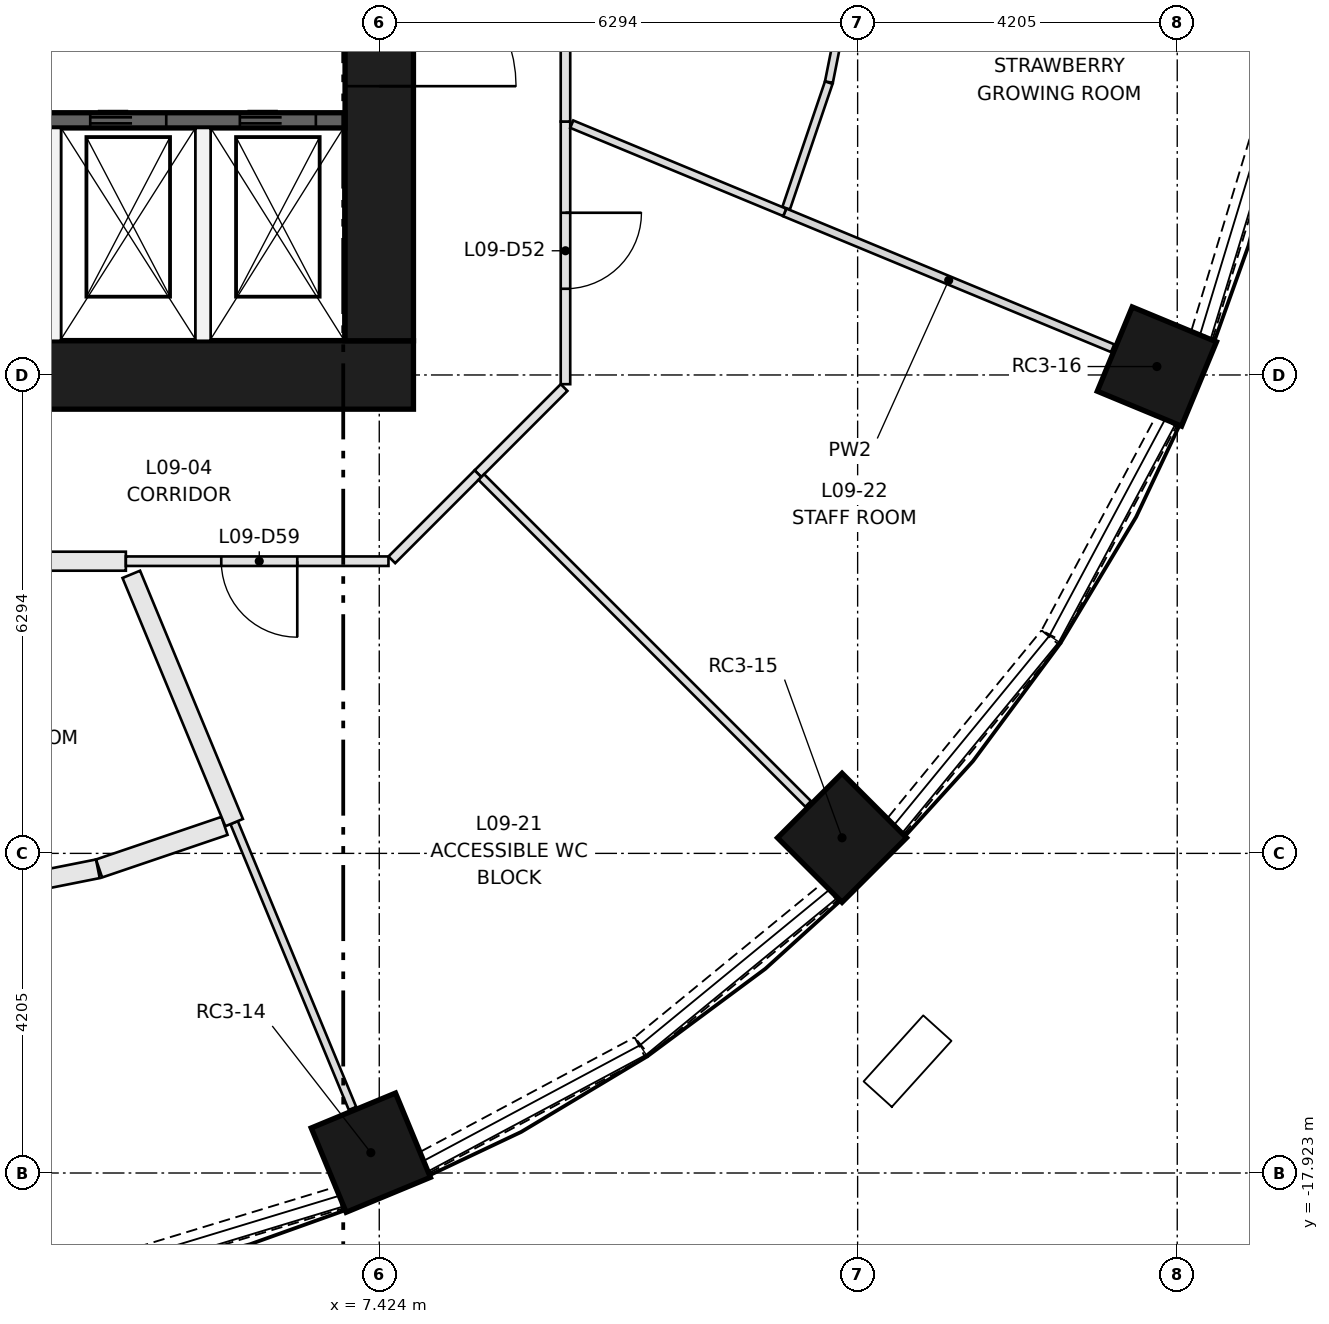
"""IFC4 building model, lengths in metres.
Left out: names, types, materials, properties, quantities, classifications, styles, units other than length and angle.
Written with IfcOpenShell. Run it as: python <this file> out.ifc"""

import sys

from ifc_helpers import new_model, si_unit, direction, frame, frame_2d, origin, origin_2d, place, context, subcontext, project, spatial, rectangle, extrude, element, fill, save


model = new_model("IFC4")
c1 = context("Model", 3, precision=1e-05, world=origin(), true_north=direction((0.0, 1.0)))
c2 = subcontext(c1, "Body", "Model", "MODEL_VIEW")
j1 = project(units=[si_unit("LENGTHUNIT", "METRE"), si_unit("PLANEANGLEUNIT", "RADIAN")], contexts=[c1])
p1 = place(None, origin())
s1 = spatial("IfcSite", under=j1, at=p1, CompositionType="ELEMENT")
p2 = place(p1, origin())
s2 = spatial("IfcBuilding", under=s1, at=p2, CompositionType="ELEMENT")
p3 = place(p2, frame((0.0, 0.0, 37.15)))
s3 = spatial("IfcBuildingStorey", under=s2, at=p3, CompositionType="ELEMENT", Elevation=37.15)
for number, where, z_axis, x_axis in (
    (1, (7.313, -17.655, 0.0), (0.0, 0.0, 1.0), (0.383, -0.924, 0.0)),
    (2, (13.513, -13.513, 0.0), (0.0, 0.0, 1.0), (0.707, -0.707, 0.0)),
    (3, (17.655, -7.313, 0.0), (0.0, 0.0, 1.0), (0.924, -0.383, 0.0)),
):
    element("IfcColumn", number, at=place(p3, frame(where, z_axis=z_axis, x_axis=x_axis)), inside=s3, PredefinedType="COLUMN", context=c2, shape_type="SweptSolid", body=[
        extrude(rectangle(XDim=1.2, YDim=1.2, at=origin_2d()), origin(), (0.0, 0.0, 1.0), 3.65),
    ])
p4 = place(p3, frame((-7.874, -7.424, 0.0), z_axis=(0.0, 0.0, 1.0), x_axis=(1.0, 0.0, 0.0)))
e4 = element("IfcWall", 4, at=p4, inside=s3, PredefinedType="SHEAR", context=c2, shape_type="SweptSolid", body=[
    extrude(rectangle(XDim=15.748, YDim=0.9, at=frame_2d((7.874, 0.0))), origin(), (0.0, 0.0, 1.0), 3.65),
])
p5 = place(p3, frame((7.424, -6.974, 0.0), z_axis=(0.0, 0.0, 1.0), x_axis=(0.0, 1.0, 0.0)))
e5 = element("IfcWall", 5, at=p5, inside=s3, PredefinedType="SHEAR", context=c2, shape_type="SweptSolid", body=[
    extrude(rectangle(XDim=13.948, YDim=0.9, at=frame_2d((6.974, 0.0))), origin(), (0.0, 0.0, 1.0), 3.65),
])
p6 = place(p5, frame((6.474, 0.0, 0.0)))
e6 = element("IfcOpeningElement", 6, at=p6, cuts=e5, PredefinedType="OPENING", context=c2, shape_type="SweptSolid", body=[
    extrude(rectangle(XDim=1.0, YDim=2.1, at=frame_2d((0.5, 1.05))), frame((0.0, 0.46, 0.0), z_axis=(0.0, -1.0, 0.0), x_axis=(1.0, 0.0, 0.0)), (0.0, 0.0, 1.0), 0.92),
])
p7 = place(p5, frame((3.35, 0.0, 0.0)))
e7 = element("IfcOpeningElement", 7, at=p7, cuts=e5, PredefinedType="OPENING", context=c2, shape_type="SweptSolid", body=[
    extrude(rectangle(XDim=1.8, YDim=2.1, at=frame_2d((0.9, 1.05))), frame((0.0, 0.46, 0.0), z_axis=(0.0, -1.0, 0.0), x_axis=(1.0, 0.0, 0.0)), (0.0, 0.0, 1.0), 0.92),
])
p8 = place(p5, frame((8.799, 0.0, 0.0)))
e8 = element("IfcOpeningElement", 8, at=p8, cuts=e5, PredefinedType="OPENING", context=c2, shape_type="SweptSolid", body=[
    extrude(rectangle(XDim=1.8, YDim=2.1, at=frame_2d((0.9, 1.05))), frame((0.0, 0.46, 0.0), z_axis=(0.0, -1.0, 0.0), x_axis=(1.0, 0.0, 0.0)), (0.0, 0.0, 1.0), 0.92),
])
p9 = place(p3, frame((-6.974, -4.074, 0.0), z_axis=(0.0, 0.0, 1.0), x_axis=(1.0, 0.0, 0.0)))
e9 = element("IfcWall", 9, at=p9, inside=s3, PredefinedType="SHEAR", context=c2, shape_type="SweptSolid", body=[
    extrude(rectangle(XDim=13.948, YDim=0.2, at=frame_2d((6.974, 0.0))), origin(), (0.0, 0.0, 1.0), 3.3),
])
p10 = place(p9, frame((0.918, 0.0, 0.0)))
e10 = element("IfcOpeningElement", 10, at=p10, cuts=e9, PredefinedType="OPENING", context=c2, shape_type="SweptSolid", body=[
    extrude(rectangle(XDim=1.1, YDim=2.1, at=frame_2d((0.55, 1.05))), frame((0.0, 0.11, 0.0), z_axis=(0.0, -1.0, 0.0), x_axis=(1.0, 0.0, 0.0)), (0.0, 0.0, 1.0), 0.22),
])
p11 = place(p9, frame((4.055, 0.0, 0.0)))
e11 = element("IfcOpeningElement", 11, at=p11, cuts=e9, PredefinedType="OPENING", context=c2, shape_type="SweptSolid", body=[
    extrude(rectangle(XDim=1.1, YDim=2.1, at=frame_2d((0.55, 1.05))), frame((0.0, 0.11, 0.0), z_axis=(0.0, -1.0, 0.0), x_axis=(1.0, 0.0, 0.0)), (0.0, 0.0, 1.0), 0.22),
])
p12 = place(p9, frame((6.658, 0.0, 0.0)))
e12 = element("IfcOpeningElement", 12, at=p12, cuts=e9, PredefinedType="OPENING", context=c2, shape_type="SweptSolid", body=[
    extrude(rectangle(XDim=1.0, YDim=2.1, at=frame_2d((0.5, 1.05))), frame((0.0, 0.11, 0.0), z_axis=(0.0, -1.0, 0.0), x_axis=(1.0, 0.0, 0.0)), (0.0, 0.0, 1.0), 0.22),
])
p13 = place(p9, frame((8.627, 0.0, 0.0)))
e13 = element("IfcOpeningElement", 13, at=p13, cuts=e9, PredefinedType="OPENING", context=c2, shape_type="SweptSolid", body=[
    extrude(rectangle(XDim=1.0, YDim=2.1, at=frame_2d((0.5, 1.05))), frame((0.0, 0.11, 0.0), z_axis=(0.0, -1.0, 0.0), x_axis=(1.0, 0.0, 0.0)), (0.0, 0.0, 1.0), 0.22),
])
p14 = place(p9, frame((10.595, 0.0, 0.0)))
e14 = element("IfcOpeningElement", 14, at=p14, cuts=e9, PredefinedType="OPENING", context=c2, shape_type="SweptSolid", body=[
    extrude(rectangle(XDim=1.0, YDim=2.1, at=frame_2d((0.5, 1.05))), frame((0.0, 0.11, 0.0), z_axis=(0.0, -1.0, 0.0), x_axis=(1.0, 0.0, 0.0)), (0.0, 0.0, 1.0), 0.22),
])
p15 = place(p9, frame((12.564, 0.0, 0.0)))
e15 = element("IfcOpeningElement", 15, at=p15, cuts=e9, PredefinedType="OPENING", context=c2, shape_type="SweptSolid", body=[
    extrude(rectangle(XDim=1.0, YDim=2.1, at=frame_2d((0.5, 1.05))), frame((0.0, 0.11, 0.0), z_axis=(0.0, -1.0, 0.0), x_axis=(1.0, 0.0, 0.0)), (0.0, 0.0, 1.0), 0.22),
])
for number, where, z_axis, x_axis in (
    (16, (3.137, -6.974, 0.0), (0.0, 0.0, 1.0), (0.0, 1.0, 0.0)),
    (17, (5.105, -6.974, 0.0), (0.0, 0.0, 1.0), (0.0, 1.0, 0.0)),
):
    element("IfcWall", number, at=place(p3, frame(where, z_axis=z_axis, x_axis=x_axis)), inside=s3, PredefinedType="PARTITIONING", context=c2, shape_type="SweptSolid", body=[
        extrude(rectangle(XDim=2.8, YDim=0.2, at=frame_2d((1.4, 0.0))), origin(), (0.0, 0.0, 1.0), 3.3),
    ])
p16 = place(p3, frame((3.83, -19.18, 0.0), z_axis=(0.0, 0.0, 1.0), x_axis=(0.956883225512, 0.290472877795, 0.0)))
e18 = element("IfcWall", 18, at=p16, inside=s3, PredefinedType="SOLIDWALL", context=c2, shape_type="SweptSolid", body=[
    extrude(rectangle(XDim=3.202, YDim=0.3, at=frame_2d((1.601, 0.0))), origin(), (0.0, 0.0, 1.0), 0.9),
])
p17 = place(p3, frame((8.028, -17.78, 0.0), z_axis=(0.0, 0.0, 1.0), x_axis=(0.881981372243, 0.471284265614, 0.0)))
e19 = element("IfcWall", 19, at=p17, inside=s3, PredefinedType="SOLIDWALL", context=c2, shape_type="SweptSolid", body=[
    extrude(rectangle(XDim=3.204, YDim=0.3, at=frame_2d((1.602, 0.0))), origin(), (0.0, 0.0, 1.0), 0.9),
])
for number, where, z_axis, x_axis in (
    (20, (10.879, -16.253, 0.0), (0.0, 0.0, 1.0), (0.773, 0.634, 0.0)),
    (21, (14.222, -13.354, 0.0), (0.0, 0.0, 1.0), (0.634, 0.773, 0.0)),
):
    element("IfcWall", number, at=place(p3, frame(where, z_axis=z_axis, x_axis=x_axis)), inside=s3, PredefinedType="SOLIDWALL", context=c2, shape_type="SweptSolid", body=[
        extrude(rectangle(XDim=3.202, YDim=0.3, at=frame_2d((1.601, 0.0))), origin(), (0.0, 0.0, 1.0), 0.9),
    ])
p18 = place(p3, frame((16.27, -10.854, 0.0), z_axis=(0.0, 0.0, 1.0), x_axis=(0.471284265614, 0.881981372243, 0.0)))
e22 = element("IfcWall", 22, at=p18, inside=s3, PredefinedType="SOLIDWALL", context=c2, shape_type="SweptSolid", body=[
    extrude(rectangle(XDim=3.204, YDim=0.3, at=frame_2d((1.602, 0.0))), origin(), (0.0, 0.0, 1.0), 0.9),
])
p19 = place(p3, frame((18.25, -6.895, 0.0), z_axis=(0.0, 0.0, 1.0), x_axis=(0.290472877795, 0.956883225512, 0.0)))
e23 = element("IfcWall", 23, at=p19, inside=s3, PredefinedType="SOLIDWALL", context=c2, shape_type="SweptSolid", body=[
    extrude(rectangle(XDim=3.202, YDim=0.3, at=frame_2d((1.601, 0.0))), origin(), (0.0, 0.0, 1.0), 0.9),
])
p20 = place(p3, frame((9.856, -7.589, 0.0), z_axis=(0.0, 0.0, 1.0), x_axis=(-0.70718294931, -0.707030604857, 0.0)))
e24 = element("IfcWall", 24, at=p20, inside=s3, PredefinedType="PARTITIONING", context=c2, shape_type="SweptSolid", body=[
    extrude(rectangle(XDim=1.603, YDim=0.125, at=frame_2d((0.801, 0.0))), origin(), (0.0, 0.0, 1.0), 3.3),
])
p21 = place(p3, frame((9.874, -4.09, 0.0), z_axis=(0.0, 0.0, 1.0), x_axis=(0.0, -1.0, 0.0)))
e25 = element("IfcWall", 25, at=p21, inside=s3, PredefinedType="PARTITIONING", context=c2, shape_type="SweptSolid", body=[
    extrude(rectangle(XDim=3.455, YDim=0.125, at=frame_2d((1.728, 0.0))), origin(), (0.0, 0.0, 1.0), 3.3),
])
p22 = place(p21, frame((1.2, 0.0, 0.0)))
e26 = element("IfcOpeningElement", 26, at=p22, cuts=e25, PredefinedType="OPENING", context=c2, shape_type="SweptSolid", body=[
    extrude(rectangle(XDim=1.0, YDim=2.1, at=frame_2d((0.5, 1.05))), frame((0.0, 0.073, 0.0), z_axis=(0.0, -1.0, 0.0), x_axis=(1.0, 0.0, 0.0)), (0.0, 0.0, 1.0), 0.145),
])
p23 = place(p3, frame((9.874, 0.0, 0.0), z_axis=(0.0, 0.0, 1.0), x_axis=(0.0, -1.0, 0.0)))
e27 = element("IfcWall", 27, at=p23, inside=s3, PredefinedType="PARTITIONING", context=c2, shape_type="SweptSolid", body=[
    extrude(rectangle(XDim=4.09, YDim=0.125, at=frame_2d((2.045, 0.0))), origin(), (0.0, 0.0, 1.0), 3.3),
])
p24 = place(p23, frame((1.5, 0.0, 0.0)))
e28 = element("IfcOpeningElement", 28, at=p24, cuts=e27, PredefinedType="OPENING", context=c2, shape_type="SweptSolid", body=[
    extrude(rectangle(XDim=1.0, YDim=2.1, at=frame_2d((0.5, 1.05))), frame((0.0, 0.073, 0.0), z_axis=(0.0, -1.0, 0.0), x_axis=(1.0, 0.0, 0.0)), (0.0, 0.0, 1.0), 0.145),
])
p25 = place(p3, frame((4.09, -9.874, 0.0), z_axis=(0.0, 0.0, 1.0), x_axis=(-1.0, 0.0, 0.0)))
e29 = element("IfcWall", 29, at=p25, inside=s3, PredefinedType="PARTITIONING", context=c2, shape_type="SweptSolid", body=[
    extrude(rectangle(XDim=3.965, YDim=0.25, at=frame_2d((1.982, 0.0))), origin(), (0.0, 0.0, 1.0), 3.3),
])
p26 = place(p3, frame((7.545, -9.874, 0.0), z_axis=(0.0, 0.0, 1.0), x_axis=(-1.0, 0.0, 0.0)))
e30 = element("IfcWall", 30, at=p26, inside=s3, PredefinedType="PARTITIONING", context=c2, shape_type="SweptSolid", body=[
    extrude(rectangle(XDim=3.455, YDim=0.125, at=frame_2d((1.728, 0.0))), origin(), (0.0, 0.0, 1.0), 3.3),
])
p27 = place(p26, frame((1.2, 0.0, 0.0)))
e31 = element("IfcOpeningElement", 31, at=p27, cuts=e30, PredefinedType="OPENING", context=c2, shape_type="SweptSolid", body=[
    extrude(rectangle(XDim=1.0, YDim=2.1, at=frame_2d((0.5, 1.05))), frame((0.0, 0.073, 0.0), z_axis=(0.0, -1.0, 0.0), x_axis=(1.0, 0.0, 0.0)), (0.0, 0.0, 1.0), 0.145),
])
p28 = place(p3, frame((8.722, -8.722, 0.0), z_axis=(0.0, 0.0, 1.0), x_axis=(-0.707030604857, -0.70718294931, 0.0)))
e32 = element("IfcWall", 32, at=p28, inside=s3, PredefinedType="PARTITIONING", context=c2, shape_type="SweptSolid", body=[
    extrude(rectangle(XDim=1.603, YDim=0.125, at=frame_2d((0.801, 0.0))), origin(), (0.0, 0.0, 1.0), 3.3),
])
p29 = place(p3, frame((17.073, -7.072, 0.0), z_axis=(0.0, 0.0, 1.0), x_axis=(-0.92387920118, 0.382684232268, 0.0)))
e33 = element("IfcWall", 33, at=p29, inside=s3, PredefinedType="PARTITIONING", context=c2, shape_type="SweptSolid", body=[
    extrude(rectangle(XDim=4.67, YDim=0.11, at=frame_2d((2.335, 0.0))), origin(), (0.0, 0.0, 1.0), 3.3),
])
p30 = place(p3, frame((12.778, -5.229, 0.0), z_axis=(0.0, 0.0, 1.0), x_axis=(0.321513757885, 0.946904907311, 0.0)))
e34 = element("IfcWall", 34, at=p30, inside=s3, PredefinedType="PARTITIONING", context=c2, shape_type="SweptSolid", body=[
    extrude(rectangle(XDim=1.744, YDim=0.105, at=frame_2d((0.872, 0.0))), origin(), (0.0, 0.0, 1.0), 3.3),
])
p31 = place(p3, frame((13.34, -3.571, 0.0), z_axis=(0.0, 0.0, 1.0), x_axis=(0.195098478373, 0.980783657968, 0.0)))
e35 = element("IfcWall", 35, at=p31, inside=s3, PredefinedType="PARTITIONING", context=c2, shape_type="SweptSolid", body=[
    extrude(rectangle(XDim=1.8, YDim=0.105, at=frame_2d((0.9, 0.0))), origin(), (0.0, 0.0, 1.0), 3.3),
])
p32 = place(p3, frame((1.889, -14.285, 0.0), z_axis=(0.0, 0.0, 1.0), x_axis=(0.980791158232, 0.195060769847, 0.0)))
e36 = element("IfcWall", 36, at=p32, inside=s3, PredefinedType="PARTITIONING", context=c2, shape_type="SweptSolid", body=[
    extrude(rectangle(XDim=1.869, YDim=0.25, at=frame_2d((0.934, 0.0))), origin(), (0.0, 0.0, 1.0), 3.3),
])
p33 = place(p3, frame((3.737, -13.917, 0.0), z_axis=(0.0, 0.0, 1.0), x_axis=(0.946889634804, 0.321558734138, 0.0)))
e37 = element("IfcWall", 37, at=p33, inside=s3, PredefinedType="PARTITIONING", context=c2, shape_type="SweptSolid", body=[
    extrude(rectangle(XDim=1.743, YDim=0.25, at=frame_2d((0.872, 0.0))), origin(), (0.0, 0.0, 1.0), 3.3),
])
p34 = place(p3, frame((5.514, -13.313, 0.0), z_axis=(0.0, 0.0, 1.0), x_axis=(0.382697907061, -0.923873536763, 0.0)))
e38 = element("IfcWall", 38, at=p34, inside=s3, PredefinedType="PARTITIONING", context=c2, shape_type="SweptSolid", body=[
    extrude(rectangle(XDim=4.07, YDim=0.105, at=frame_2d((2.035, 0.0))), origin(), (0.0, 0.0, 1.0), 3.3),
])
p35 = place(p3, frame((4.162, -10.047, 0.0), z_axis=(0.0, 0.0, 1.0), x_axis=(0.382662857696, -0.92388805455, 0.0)))
e39 = element("IfcWall", 39, at=p35, inside=s3, PredefinedType="PARTITIONING", context=c2, shape_type="SweptSolid", body=[
    extrude(rectangle(XDim=3.535, YDim=0.25, at=frame_2d((1.768, 0.0))), origin(), (0.0, 0.0, 1.0), 3.3),
])
p36 = place(p3, frame((8.767, -8.767, 0.0), z_axis=(0.0, 0.0, 1.0), x_axis=(0.707106781187, -0.707106781187, 0.0)))
e40 = element("IfcWall", 40, at=p36, inside=s3, PredefinedType="PARTITIONING", context=c2, shape_type="SweptSolid", body=[
    extrude(rectangle(XDim=6.082, YDim=0.105, at=frame_2d((3.041, 0.0))), origin(), (0.0, 0.0, 1.0), 3.3),
])
p37 = place(p3, frame((9.957, -4.124, 0.0), z_axis=(0.0, 0.0, 1.0), x_axis=(0.923860842545, -0.382728550819, 0.0)))
e41 = element("IfcWall", 41, at=p37, inside=s3, PredefinedType="PARTITIONING", context=c2, shape_type="SweptSolid", body=[
    extrude(rectangle(XDim=3.033, YDim=0.105, at=frame_2d((1.517, 0.0))), origin(), (0.0, 0.0, 1.0), 3.3),
])
p38 = place(p14, origin())
e42 = element("IfcDoor", 42, at=p38, inside=s3, OperationType="DOUBLE_DOOR_SLIDING", PredefinedType="DOOR", context=c2, shape_type="SweptSolid", body=[
    extrude(rectangle(XDim=1.0, YDim=2.1, at=frame_2d((0.5, 1.05))), frame((0.0, 0.025, 0.0), z_axis=(0.0, -1.0, 0.0), x_axis=(1.0, 0.0, 0.0)), (0.0, 0.0, 1.0), 0.05),
])
fill(e14, e42)
p39 = place(p15, origin())
e43 = element("IfcDoor", 43, at=p39, inside=s3, OperationType="DOUBLE_DOOR_SLIDING", PredefinedType="DOOR", context=c2, shape_type="SweptSolid", body=[
    extrude(rectangle(XDim=1.0, YDim=2.1, at=frame_2d((0.5, 1.05))), frame((0.0, 0.025, 0.0), z_axis=(0.0, -1.0, 0.0), x_axis=(1.0, 0.0, 0.0)), (0.0, 0.0, 1.0), 0.05),
])
fill(e15, e43)
p40 = place(p7, frame((1.8, 0.0, 0.0), z_axis=(0.0, 0.0, 1.0), x_axis=(-1.0, 0.0, 0.0)))
e44 = element("IfcDoor", 44, at=p40, inside=s3, OperationType="DOUBLE_DOOR_SINGLE_SWING", PredefinedType="DOOR", context=c2, shape_type="SweptSolid", body=[
    extrude(rectangle(XDim=1.8, YDim=2.1, at=frame_2d((0.9, 1.05))), frame((0.0, 0.025, 0.0), z_axis=(0.0, -1.0, 0.0), x_axis=(1.0, 0.0, 0.0)), (0.0, 0.0, 1.0), 0.05),
])
fill(e7, e44)
p41 = place(p22, origin())
e45 = element("IfcDoor", 45, at=p41, inside=s3, OperationType="SINGLE_SWING_LEFT", PredefinedType="DOOR", context=c2, shape_type="SweptSolid", body=[
    extrude(rectangle(XDim=1.0, YDim=2.1, at=frame_2d((0.5, 1.05))), frame((0.0, 0.025, 0.0), z_axis=(0.0, -1.0, 0.0), x_axis=(1.0, 0.0, 0.0)), (0.0, 0.0, 1.0), 0.05),
])
fill(e26, e45)
p42 = place(p27, origin())
e46 = element("IfcDoor", 46, at=p42, inside=s3, OperationType="SINGLE_SWING_LEFT", PredefinedType="DOOR", context=c2, shape_type="SweptSolid", body=[
    extrude(rectangle(XDim=1.0, YDim=2.1, at=frame_2d((0.5, 1.05))), frame((0.0, 0.025, 0.0), z_axis=(0.0, -1.0, 0.0), x_axis=(1.0, 0.0, 0.0)), (0.0, 0.0, 1.0), 0.05),
])
fill(e31, e46)
save(model, sys.argv[1])
